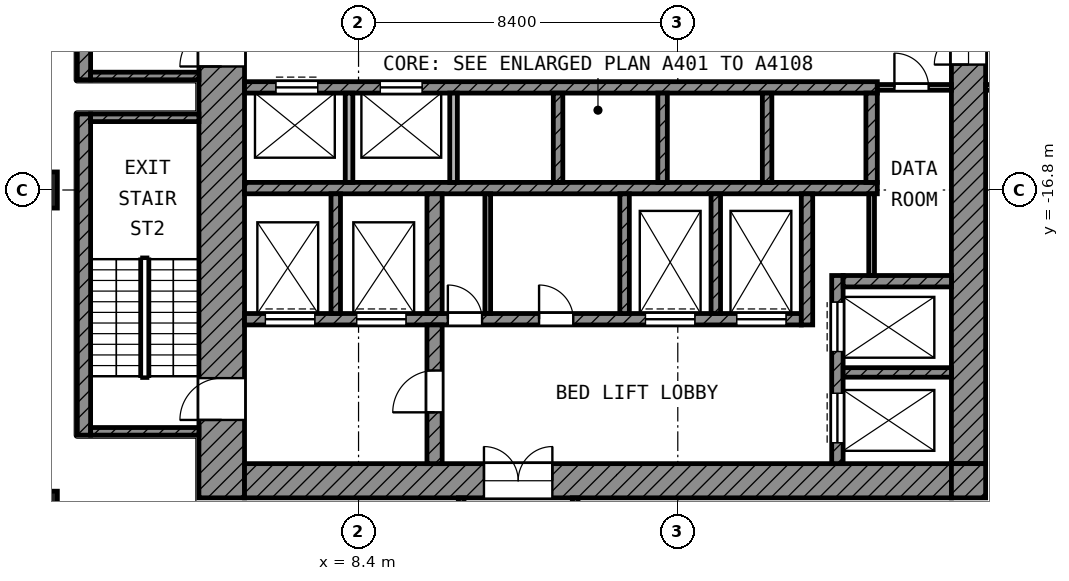
"""IFC4 building model, lengths in metres.
Left out: names, types, materials, properties, quantities, classifications, styles, units other than length and angle.
Written with IfcOpenShell. Run it as: python <this file> out.ifc"""

import sys

from ifc_helpers import new_model, si_unit, direction, frame, frame_2d, origin, origin_2d, place, context, subcontext, project, spatial, rectangle, extrude, element, fill, save


model = new_model("IFC4")
c1 = context("Model", 3, precision=1e-05, world=origin(), true_north=direction((0.0, 1.0)))
c2 = subcontext(c1, "Body", "Model", "MODEL_VIEW")
j1 = project(units=[si_unit("LENGTHUNIT", "METRE"), si_unit("PLANEANGLEUNIT", "RADIAN")], contexts=[c1])
p1 = place(None, origin())
s1 = spatial("IfcSite", under=j1, at=p1, CompositionType="ELEMENT")
p2 = place(p1, origin())
s2 = spatial("IfcBuilding", under=s1, at=p2, CompositionType="ELEMENT")
p3 = place(p2, frame((0.0, 0.0, 192.0)))
s3 = spatial("IfcBuildingStorey", under=s2, at=p3, CompositionType="ELEMENT", Elevation=192.0)
for number, where, z_axis, x_axis in (
    (1, (0.0, -16.8, 0.0), (0.0, 0.0, 1.0), (1.0, 0.0, 0.0)),
    (2, (0.0, -25.2, 0.0), (0.0, 0.0, 1.0), (1.0, 0.0, 0.0)),
):
    element("IfcColumn", number, at=place(p3, frame(where, z_axis=z_axis, x_axis=x_axis)), inside=s3, PredefinedType="COLUMN", context=c2, shape_type="SweptSolid", body=[
        extrude(rectangle(XDim=0.95, YDim=0.95, at=origin_2d()), origin(), (0.0, 0.0, 1.0), 4.2),
    ])
p4 = place(p3, frame((4.8, -24.9, 0.0), z_axis=(0.0, 0.0, 1.0), x_axis=(0.0, 1.0, 0.0)))
e3 = element("IfcWall", 3, at=p4, inside=s3, PredefinedType="SHEAR", context=c2, shape_type="SweptSolid", body=[
    extrude(rectangle(XDim=19.5, YDim=1.2, at=frame_2d((9.75, 0.0))), origin(), (0.0, 0.0, 1.0), 3.6),
])
p5 = place(p4, frame((11.35, 0.0, 0.0)))
e4 = element("IfcOpeningElement", 4, at=p5, cuts=e3, PredefinedType="OPENING", context=c2, shape_type="SweptSolid", body=[
    extrude(rectangle(XDim=1.1, YDim=2.1, at=frame_2d((0.55, 1.05))), frame((0.0, 0.61, 0.0), z_axis=(0.0, -1.0, 0.0), x_axis=(1.0, 0.0, 0.0)), (0.0, 0.0, 1.0), 1.22),
])
p6 = place(p4, frame((2.05, 0.0, 0.0)))
e5 = element("IfcOpeningElement", 5, at=p6, cuts=e3, PredefinedType="OPENING", context=c2, shape_type="SweptSolid", body=[
    extrude(rectangle(XDim=1.1, YDim=2.1, at=frame_2d((0.55, 1.05))), frame((0.0, 0.61, 0.0), z_axis=(0.0, -1.0, 0.0), x_axis=(1.0, 0.0, 0.0)), (0.0, 0.0, 1.0), 1.22),
])
p7 = place(p3, frame((24.45, -24.0, 0.0), z_axis=(0.0, 0.0, 1.0), x_axis=(0.0, 1.0, 0.0)))
e6 = element("IfcWall", 6, at=p7, inside=s3, PredefinedType="SHEAR", context=c2, shape_type="SweptSolid", body=[
    extrude(rectangle(XDim=18.6, YDim=0.9, at=frame_2d((9.3, 0.0))), origin(), (0.0, 0.0, 1.0), 3.6),
])
p8 = place(p7, frame((10.5, 0.0, 0.0)))
e7 = element("IfcOpeningElement", 7, at=p8, cuts=e6, PredefinedType="OPENING", context=c2, shape_type="SweptSolid", body=[
    extrude(rectangle(XDim=1.8, YDim=2.1, at=frame_2d((0.9, 1.05))), frame((0.0, 0.46, 0.0), z_axis=(0.0, -1.0, 0.0), x_axis=(1.0, 0.0, 0.0)), (0.0, 0.0, 1.0), 0.92),
])
p9 = place(p3, frame((5.4, -24.45, 0.0), z_axis=(0.0, 0.0, 1.0), x_axis=(1.0, 0.0, 0.0)))
e8 = element("IfcWall", 8, at=p9, inside=s3, PredefinedType="SHEAR", context=c2, shape_type="SweptSolid", body=[
    extrude(rectangle(XDim=18.6, YDim=0.9, at=frame_2d((9.3, 0.0))), origin(), (0.0, 0.0, 1.0), 3.6),
])
p10 = place(p9, frame((6.3, 0.0, 0.0)))
e9 = element("IfcOpeningElement", 9, at=p10, cuts=e8, PredefinedType="OPENING", context=c2, shape_type="SweptSolid", body=[
    extrude(rectangle(XDim=1.8, YDim=2.1, at=frame_2d((0.9, 1.05))), frame((0.0, 0.46, 0.0), z_axis=(0.0, -1.0, 0.0), x_axis=(1.0, 0.0, 0.0)), (0.0, 0.0, 1.0), 0.92),
])
p11 = place(p3, frame((24.45, -24.9, 0.0), z_axis=(0.0, 0.0, 1.0), x_axis=(0.0, 1.0, 0.0)))
e10 = element("IfcWall", 10, at=p11, inside=s3, PredefinedType="SHEAR", context=c2, shape_type="SweptSolid", body=[
    extrude(rectangle(XDim=0.9, YDim=0.9, at=frame_2d((0.45, 0.0))), origin(), (0.0, 0.0, 1.0), 3.6),
])
p12 = place(p3, frame((5.4, -14.1, 0.0), z_axis=(0.0, 0.0, 1.0), x_axis=(1.0, 0.0, 0.0)))
e11 = element("IfcWall", 11, at=p12, inside=s3, PredefinedType="SHEAR", context=c2, shape_type="SweptSolid", body=[
    extrude(rectangle(XDim=16.65, YDim=0.3, at=frame_2d((8.325, 0.0))), origin(), (0.0, 0.0, 1.0), 3.6),
])
p13 = place(p12, frame((0.825, 0.0, 0.0)))
e12 = element("IfcOpeningElement", 12, at=p13, cuts=e11, PredefinedType="OPENING", context=c2, shape_type="SweptSolid", body=[
    extrude(rectangle(XDim=1.1, YDim=2.1, at=frame_2d((0.55, 1.05))), frame((0.0, 0.16, 0.0), z_axis=(0.0, -1.0, 0.0), x_axis=(1.0, 0.0, 0.0)), (0.0, 0.0, 1.0), 0.32),
])
p14 = place(p12, frame((3.575, 0.0, 0.0)))
e13 = element("IfcOpeningElement", 13, at=p14, cuts=e11, PredefinedType="OPENING", context=c2, shape_type="SweptSolid", body=[
    extrude(rectangle(XDim=1.1, YDim=2.1, at=frame_2d((0.55, 1.05))), frame((0.0, 0.16, 0.0), z_axis=(0.0, -1.0, 0.0), x_axis=(1.0, 0.0, 0.0)), (0.0, 0.0, 1.0), 0.32),
])
p15 = place(p3, frame((5.4, -16.75, 0.0), z_axis=(0.0, 0.0, 1.0), x_axis=(1.0, 0.0, 0.0)))
e14 = element("IfcWall", 14, at=p15, inside=s3, PredefinedType="SHEAR", context=c2, shape_type="SweptSolid", body=[
    extrude(rectangle(XDim=16.65, YDim=0.3, at=frame_2d((8.325, 0.0))), origin(), (0.0, 0.0, 1.0), 3.6),
])
p16 = place(p3, frame((5.4, -20.2, 0.0), z_axis=(0.0, 0.0, 1.0), x_axis=(1.0, 0.0, 0.0)))
e15 = element("IfcWall", 15, at=p16, inside=s3, PredefinedType="SHEAR", context=c2, shape_type="SweptSolid", body=[
    extrude(rectangle(XDim=14.65, YDim=0.3, at=frame_2d((7.325, 0.0))), origin(), (0.0, 0.0, 1.0), 3.6),
])
p17 = place(p16, frame((10.55, 0.0, 0.0)))
e16 = element("IfcOpeningElement", 16, at=p17, cuts=e15, PredefinedType="OPENING", context=c2, shape_type="SweptSolid", body=[
    extrude(rectangle(XDim=1.3, YDim=2.1, at=frame_2d((0.65, 1.05))), frame((0.0, 0.16, 0.0), z_axis=(0.0, -1.0, 0.0), x_axis=(1.0, 0.0, 0.0)), (0.0, 0.0, 1.0), 0.32),
])
p18 = place(p16, frame((12.95, 0.0, 0.0)))
e17 = element("IfcOpeningElement", 17, at=p18, cuts=e15, PredefinedType="OPENING", context=c2, shape_type="SweptSolid", body=[
    extrude(rectangle(XDim=1.3, YDim=2.1, at=frame_2d((0.65, 1.05))), frame((0.0, 0.16, 0.0), z_axis=(0.0, -1.0, 0.0), x_axis=(1.0, 0.0, 0.0)), (0.0, 0.0, 1.0), 0.32),
])
p19 = place(p16, frame((0.55, 0.0, 0.0)))
e18 = element("IfcOpeningElement", 18, at=p19, cuts=e15, PredefinedType="OPENING", context=c2, shape_type="SweptSolid", body=[
    extrude(rectangle(XDim=1.3, YDim=2.1, at=frame_2d((0.65, 1.05))), frame((0.0, 0.16, 0.0), z_axis=(0.0, -1.0, 0.0), x_axis=(1.0, 0.0, 0.0)), (0.0, 0.0, 1.0), 0.32),
])
p20 = place(p16, frame((2.95, 0.0, 0.0)))
e19 = element("IfcOpeningElement", 19, at=p20, cuts=e15, PredefinedType="OPENING", context=c2, shape_type="SweptSolid", body=[
    extrude(rectangle(XDim=1.3, YDim=2.1, at=frame_2d((0.65, 1.05))), frame((0.0, 0.16, 0.0), z_axis=(0.0, -1.0, 0.0), x_axis=(1.0, 0.0, 0.0)), (0.0, 0.0, 1.0), 0.32),
])
p21 = place(p16, frame((5.35, 0.0, 0.0)))
e20 = element("IfcOpeningElement", 20, at=p21, cuts=e15, PredefinedType="OPENING", context=c2, shape_type="SweptSolid", body=[
    extrude(rectangle(XDim=0.9, YDim=2.1, at=frame_2d((0.45, 1.05))), frame((0.0, 0.16, 0.0), z_axis=(0.0, -1.0, 0.0), x_axis=(1.0, 0.0, 0.0)), (0.0, 0.0, 1.0), 0.32),
])
p22 = place(p16, frame((7.75, 0.0, 0.0)))
e21 = element("IfcOpeningElement", 21, at=p22, cuts=e15, PredefinedType="OPENING", context=c2, shape_type="SweptSolid", body=[
    extrude(rectangle(XDim=0.9, YDim=2.1, at=frame_2d((0.45, 1.05))), frame((0.0, 0.16, 0.0), z_axis=(0.0, -1.0, 0.0), x_axis=(1.0, 0.0, 0.0)), (0.0, 0.0, 1.0), 0.32),
])
p23 = place(p3, frame((10.4, -24.0, 0.0), z_axis=(0.0, 0.0, 1.0), x_axis=(0.0, 1.0, 0.0)))
e22 = element("IfcWall", 22, at=p23, inside=s3, PredefinedType="SHEAR", context=c2, shape_type="SweptSolid", body=[
    extrude(rectangle(XDim=3.65, YDim=0.4, at=frame_2d((1.825, 0.0))), origin(), (0.0, 0.0, 1.0), 3.6),
])
p24 = place(p23, frame((1.35, 0.0, 0.0)))
e23 = element("IfcOpeningElement", 23, at=p24, cuts=e22, PredefinedType="OPENING", context=c2, shape_type="SweptSolid", body=[
    extrude(rectangle(XDim=1.1, YDim=2.1, at=frame_2d((0.55, 1.05))), frame((0.0, 0.21, 0.0), z_axis=(0.0, -1.0, 0.0), x_axis=(1.0, 0.0, 0.0)), (0.0, 0.0, 1.0), 0.42),
])
p25 = place(p3, frame((10.4, -20.05, 0.0), z_axis=(0.0, 0.0, 1.0), x_axis=(0.0, 1.0, 0.0)))
e24 = element("IfcWall", 24, at=p25, inside=s3, PredefinedType="SHEAR", context=c2, shape_type="SweptSolid", body=[
    extrude(rectangle(XDim=3.15, YDim=0.4, at=frame_2d((1.575, 0.0))), origin(), (0.0, 0.0, 1.0), 3.6),
])
p26 = place(p3, frame((20.2, -20.35, 0.0), z_axis=(0.0, 0.0, 1.0), x_axis=(0.0, 1.0, 0.0)))
e25 = element("IfcWall", 25, at=p26, inside=s3, PredefinedType="SHEAR", context=c2, shape_type="SweptSolid", body=[
    extrude(rectangle(XDim=3.45, YDim=0.3, at=frame_2d((1.725, 0.0))), origin(), (0.0, 0.0, 1.0), 3.6),
])
p27 = place(p3, frame((21.9, -16.6, 0.0), z_axis=(0.0, 0.0, 1.0), x_axis=(0.0, 1.0, 0.0)))
e26 = element("IfcWall", 26, at=p27, inside=s3, PredefinedType="SHEAR", context=c2, shape_type="SweptSolid", body=[
    extrude(rectangle(XDim=2.35, YDim=0.3, at=frame_2d((1.175, 0.0))), origin(), (0.0, 0.0, 1.0), 3.6),
])
p28 = place(p3, frame((21.15, -19.2, 0.0), z_axis=(0.0, 0.0, 1.0), x_axis=(1.0, 0.0, 0.0)))
e27 = element("IfcWall", 27, at=p28, inside=s3, PredefinedType="SHEAR", context=c2, shape_type="SweptSolid", body=[
    extrude(rectangle(XDim=2.85, YDim=0.3, at=frame_2d((1.425, 0.0))), origin(), (0.0, 0.0, 1.0), 3.6),
])
p29 = place(p3, frame((21.0, -24.0, 0.0), z_axis=(0.0, 0.0, 1.0), x_axis=(0.0, 1.0, 0.0)))
e28 = element("IfcWall", 28, at=p29, inside=s3, PredefinedType="SHEAR", context=c2, shape_type="SweptSolid", body=[
    extrude(rectangle(XDim=4.95, YDim=0.3, at=frame_2d((2.475, 0.0))), origin(), (0.0, 0.0, 1.0), 3.6),
])
p30 = place(p29, frame((2.95, 0.0, 0.0)))
e29 = element("IfcOpeningElement", 29, at=p30, cuts=e28, PredefinedType="OPENING", context=c2, shape_type="SweptSolid", body=[
    extrude(rectangle(XDim=1.3, YDim=2.1, at=frame_2d((0.65, 1.05))), frame((0.0, 0.16, 0.0), z_axis=(0.0, -1.0, 0.0), x_axis=(1.0, 0.0, 0.0)), (0.0, 0.0, 1.0), 0.32),
])
p31 = place(p29, frame((0.55, 0.0, 0.0)))
e30 = element("IfcOpeningElement", 30, at=p31, cuts=e28, PredefinedType="OPENING", context=c2, shape_type="SweptSolid", body=[
    extrude(rectangle(XDim=1.3, YDim=2.1, at=frame_2d((0.65, 1.05))), frame((0.0, 0.16, 0.0), z_axis=(0.0, -1.0, 0.0), x_axis=(1.0, 0.0, 0.0)), (0.0, 0.0, 1.0), 0.32),
])
p32 = place(p3, frame((21.15, -21.6, 0.0), z_axis=(0.0, 0.0, 1.0), x_axis=(1.0, 0.0, 0.0)))
e31 = element("IfcWall", 31, at=p32, inside=s3, PredefinedType="SHEAR", context=c2, shape_type="SweptSolid", body=[
    extrude(rectangle(XDim=2.85, YDim=0.25, at=frame_2d((1.425, 0.0))), origin(), (0.0, 0.0, 1.0), 3.6),
])
for number, where, z_axis, x_axis in (
    (32, (7.8, -20.05, 0.0), (0.0, 0.0, 1.0), (0.0, 1.0, 0.0)),
    (33, (15.4, -20.05, 0.0), (0.0, 0.0, 1.0), (0.0, 1.0, 0.0)),
    (34, (17.8, -20.05, 0.0), (0.0, 0.0, 1.0), (0.0, 1.0, 0.0)),
):
    element("IfcWall", number, at=place(p3, frame(where, z_axis=z_axis, x_axis=x_axis)), inside=s3, PredefinedType="SHEAR", context=c2, shape_type="SweptSolid", body=[
        extrude(rectangle(XDim=3.15, YDim=0.25, at=frame_2d((1.575, 0.0))), origin(), (0.0, 0.0, 1.0), 3.6),
    ])
for number, where, z_axis, x_axis in (
    (35, (8.15, -16.6, 0.0), (0.0, 0.0, 1.0), (0.0, 1.0, 0.0)),
    (36, (10.9, -16.6, 0.0), (0.0, 0.0, 1.0), (0.0, 1.0, 0.0)),
):
    element("IfcWall", number, at=place(p3, frame(where, z_axis=z_axis, x_axis=x_axis)), inside=s3, PredefinedType="PARTITIONING", context=c2, shape_type="SweptSolid", body=[
        extrude(rectangle(XDim=2.35, YDim=0.2, at=frame_2d((1.175, 0.0))), origin(), (0.0, 0.0, 1.0), 3.6),
    ])
for number, where, z_axis, x_axis in (
    (37, (13.65, -16.6, 0.0), (0.0, 0.0, 1.0), (0.0, 1.0, 0.0)),
    (38, (16.4, -16.6, 0.0), (0.0, 0.0, 1.0), (0.0, 1.0, 0.0)),
    (39, (19.15, -16.6, 0.0), (0.0, 0.0, 1.0), (0.0, 1.0, 0.0)),
):
    element("IfcWall", number, at=place(p3, frame(where, z_axis=z_axis, x_axis=x_axis)), inside=s3, PredefinedType="SHEAR", context=c2, shape_type="SweptSolid", body=[
        extrude(rectangle(XDim=2.35, YDim=0.25, at=frame_2d((1.175, 0.0))), origin(), (0.0, 0.0, 1.0), 3.6),
    ])
p33 = place(p3, frame((21.9, -19.05, 0.0), z_axis=(0.0, 0.0, 1.0), x_axis=(0.0, 1.0, 0.0)))
e40 = element("IfcWall", 40, at=p33, inside=s3, PredefinedType="PARTITIONING", context=c2, shape_type="SweptSolid", body=[
    extrude(rectangle(XDim=2.15, YDim=0.15, at=frame_2d((1.075, 0.0))), origin(), (0.0, 0.0, 1.0), 3.6),
])
p34 = place(p3, frame((22.05, -14.1, 0.0), z_axis=(0.0, 0.0, 1.0), x_axis=(1.0, 0.0, 0.0)))
e41 = element("IfcWall", 41, at=p34, inside=s3, PredefinedType="PARTITIONING", context=c2, shape_type="SweptSolid", body=[
    extrude(rectangle(XDim=1.95, YDim=0.15, at=frame_2d((0.975, 0.0))), origin(), (0.0, 0.0, 1.0), 3.6),
])
p35 = place(p34, frame((0.45, 0.0, 0.0)))
e42 = element("IfcOpeningElement", 42, at=p35, cuts=e41, PredefinedType="OPENING", context=c2, shape_type="SweptSolid", body=[
    extrude(rectangle(XDim=0.9, YDim=2.1, at=frame_2d((0.45, 1.05))), frame((0.0, 0.085, 0.0), z_axis=(0.0, -1.0, 0.0), x_axis=(1.0, 0.0, 0.0)), (0.0, 0.0, 1.0), 0.17),
])
p36 = place(p3, frame((11.8, -20.05, 0.0), z_axis=(0.0, 0.0, 1.0), x_axis=(0.0, 1.0, 0.0)))
e43 = element("IfcWall", 43, at=p36, inside=s3, PredefinedType="PARTITIONING", context=c2, shape_type="SweptSolid", body=[
    extrude(rectangle(XDim=3.15, YDim=0.15, at=frame_2d((1.575, 0.0))), origin(), (0.0, 0.0, 1.0), 3.6),
])
p37 = place(p3, frame((1.175, -13.9, 0.0), z_axis=(0.0, 0.0, 1.0), x_axis=(0.0, 1.0, 0.0)))
e44 = element("IfcWall", 44, at=p37, inside=s3, PredefinedType="SHEAR", context=c2, shape_type="SweptSolid", body=[
    extrude(rectangle(XDim=8.45, YDim=0.35, at=frame_2d((4.225, 0.0))), origin(), (0.0, 0.0, 1.0), 3.6),
])
p38 = place(p3, frame((1.35, -13.8, 0.0), z_axis=(0.0, 0.0, 1.0), x_axis=(1.0, 0.0, 0.0)))
e45 = element("IfcWall", 45, at=p38, inside=s3, PredefinedType="SHEAR", context=c2, shape_type="SweptSolid", body=[
    extrude(rectangle(XDim=2.85, YDim=0.2, at=frame_2d((1.425, 0.0))), origin(), (0.0, 0.0, 1.0), 3.6),
])
p39 = place(p3, frame((1.175, -23.25, 0.0), z_axis=(0.0, 0.0, 1.0), x_axis=(0.0, 1.0, 0.0)))
e46 = element("IfcWall", 46, at=p39, inside=s3, PredefinedType="SHEAR", context=c2, shape_type="SweptSolid", body=[
    extrude(rectangle(XDim=8.45, YDim=0.35, at=frame_2d((4.225, 0.0))), origin(), (0.0, 0.0, 1.0), 3.6),
])
for number, where, z_axis, x_axis in (
    (47, (1.35, -14.9, 0.0), (0.0, 0.0, 1.0), (1.0, 0.0, 0.0)),
    (48, (1.35, -23.15, 0.0), (0.0, 0.0, 1.0), (1.0, 0.0, 0.0)),
):
    element("IfcWall", number, at=place(p3, frame(where, z_axis=z_axis, x_axis=x_axis)), inside=s3, PredefinedType="SHEAR", context=c2, shape_type="SweptSolid", body=[
        extrude(rectangle(XDim=2.85, YDim=0.2, at=frame_2d((1.425, 0.0))), origin(), (0.0, 0.0, 1.0), 3.6),
    ])
p40 = place(p3, frame((24.9, -14.1, 0.0), z_axis=(0.0, 0.0, 1.0), x_axis=(1.0, 0.0, 0.0)))
e49 = element("IfcWall", 49, at=p40, inside=s3, PredefinedType="PARTITIONING", context=c2, shape_type="SweptSolid", body=[
    extrude(rectangle(XDim=4.425, YDim=0.15, at=frame_2d((2.212, 0.0))), origin(), (0.0, 0.0, 1.0), 3.6),
])
p41 = place(p40, frame((1.65, 0.0, 0.0)))
e50 = element("IfcOpeningElement", 50, at=p41, cuts=e49, PredefinedType="OPENING", context=c2, shape_type="SweptSolid", body=[
    extrude(rectangle(XDim=1.5, YDim=2.1, at=frame_2d((0.75, 1.05))), frame((0.0, 0.085, 0.0), z_axis=(0.0, -1.0, 0.0), x_axis=(1.0, 0.0, 0.0)), (0.0, 0.0, 1.0), 0.17),
])
p42 = place(p3, frame((11.1, -29.397, 0.0), z_axis=(0.0, 0.0, 1.0), x_axis=(0.0, 1.0, 0.0)))
e51 = element("IfcWall", 51, at=p42, inside=s3, PredefinedType="PARTITIONING", context=c2, shape_type="SweptSolid", body=[
    extrude(rectangle(XDim=4.497, YDim=0.15, at=frame_2d((2.249, 0.0))), origin(), (0.0, 0.0, 1.0), 3.6),
])
p43 = place(p3, frame((14.1, -29.4, 0.0), z_axis=(0.0, 0.0, 1.0), x_axis=(0.0, 1.0, 0.0)))
e52 = element("IfcWall", 52, at=p43, inside=s3, PredefinedType="PARTITIONING", context=c2, shape_type="SweptSolid", body=[
    extrude(rectangle(XDim=4.5, YDim=0.15, at=frame_2d((2.25, 0.0))), origin(), (0.0, 0.0, 1.0), 3.6),
])
p44 = place(p13, origin())
e53 = element("IfcDoor", 53, at=p44, inside=s3, OperationType="DOUBLE_DOOR_SLIDING", PredefinedType="DOOR", context=c2, shape_type="SweptSolid", body=[
    extrude(rectangle(XDim=1.1, YDim=2.1, at=frame_2d((0.55, 1.05))), frame((0.0, 0.025, 0.0), z_axis=(0.0, -1.0, 0.0), x_axis=(1.0, 0.0, 0.0)), (0.0, 0.0, 1.0), 0.05),
])
fill(e12, e53)
p45 = place(p14, origin())
e54 = element("IfcDoor", 54, at=p45, inside=s3, OperationType="DOUBLE_DOOR_SLIDING", PredefinedType="DOOR", context=c2, shape_type="SweptSolid", body=[
    extrude(rectangle(XDim=1.1, YDim=2.1, at=frame_2d((0.55, 1.05))), frame((0.0, 0.025, 0.0), z_axis=(0.0, -1.0, 0.0), x_axis=(1.0, 0.0, 0.0)), (0.0, 0.0, 1.0), 0.05),
])
fill(e13, e54)
p46 = place(p30, origin())
e55 = element("IfcDoor", 55, at=p46, inside=s3, OperationType="DOUBLE_DOOR_SLIDING", PredefinedType="DOOR", context=c2, shape_type="SweptSolid", body=[
    extrude(rectangle(XDim=1.3, YDim=2.1, at=frame_2d((0.65, 1.05))), frame((0.0, 0.025, 0.0), z_axis=(0.0, -1.0, 0.0), x_axis=(1.0, 0.0, 0.0)), (0.0, 0.0, 1.0), 0.05),
])
fill(e29, e55)
p47 = place(p31, origin())
e56 = element("IfcDoor", 56, at=p47, inside=s3, OperationType="DOUBLE_DOOR_SLIDING", PredefinedType="DOOR", context=c2, shape_type="SweptSolid", body=[
    extrude(rectangle(XDim=1.3, YDim=2.1, at=frame_2d((0.65, 1.05))), frame((0.0, 0.025, 0.0), z_axis=(0.0, -1.0, 0.0), x_axis=(1.0, 0.0, 0.0)), (0.0, 0.0, 1.0), 0.05),
])
fill(e30, e56)
p48 = place(p17, origin())
e57 = element("IfcDoor", 57, at=p48, inside=s3, OperationType="DOUBLE_DOOR_SLIDING", PredefinedType="DOOR", context=c2, shape_type="SweptSolid", body=[
    extrude(rectangle(XDim=1.3, YDim=2.1, at=frame_2d((0.65, 1.05))), frame((0.0, 0.025, 0.0), z_axis=(0.0, -1.0, 0.0), x_axis=(1.0, 0.0, 0.0)), (0.0, 0.0, 1.0), 0.05),
])
fill(e16, e57)
p49 = place(p18, origin())
e58 = element("IfcDoor", 58, at=p49, inside=s3, OperationType="DOUBLE_DOOR_SLIDING", PredefinedType="DOOR", context=c2, shape_type="SweptSolid", body=[
    extrude(rectangle(XDim=1.3, YDim=2.1, at=frame_2d((0.65, 1.05))), frame((0.0, 0.025, 0.0), z_axis=(0.0, -1.0, 0.0), x_axis=(1.0, 0.0, 0.0)), (0.0, 0.0, 1.0), 0.05),
])
fill(e17, e58)
p50 = place(p19, origin())
e59 = element("IfcDoor", 59, at=p50, inside=s3, OperationType="DOUBLE_DOOR_SLIDING", PredefinedType="DOOR", context=c2, shape_type="SweptSolid", body=[
    extrude(rectangle(XDim=1.3, YDim=2.1, at=frame_2d((0.65, 1.05))), frame((0.0, 0.025, 0.0), z_axis=(0.0, -1.0, 0.0), x_axis=(1.0, 0.0, 0.0)), (0.0, 0.0, 1.0), 0.05),
])
fill(e18, e59)
p51 = place(p20, origin())
e60 = element("IfcDoor", 60, at=p51, inside=s3, OperationType="DOUBLE_DOOR_SLIDING", PredefinedType="DOOR", context=c2, shape_type="SweptSolid", body=[
    extrude(rectangle(XDim=1.3, YDim=2.1, at=frame_2d((0.65, 1.05))), frame((0.0, 0.025, 0.0), z_axis=(0.0, -1.0, 0.0), x_axis=(1.0, 0.0, 0.0)), (0.0, 0.0, 1.0), 0.05),
])
fill(e19, e60)
p52 = place(p5, origin())
e61 = element("IfcDoor", 61, at=p52, inside=s3, OperationType="SINGLE_SWING_LEFT", PredefinedType="DOOR", context=c2, shape_type="SweptSolid", body=[
    extrude(rectangle(XDim=1.1, YDim=2.1, at=frame_2d((0.55, 1.05))), frame((0.0, 0.025, 0.0), z_axis=(0.0, -1.0, 0.0), x_axis=(1.0, 0.0, 0.0)), (0.0, 0.0, 1.0), 0.05),
])
fill(e4, e61)
p53 = place(p6, origin())
e62 = element("IfcDoor", 62, at=p53, inside=s3, OperationType="SINGLE_SWING_LEFT", PredefinedType="DOOR", context=c2, shape_type="SweptSolid", body=[
    extrude(rectangle(XDim=1.1, YDim=2.1, at=frame_2d((0.55, 1.05))), frame((0.0, 0.025, 0.0), z_axis=(0.0, -1.0, 0.0), x_axis=(1.0, 0.0, 0.0)), (0.0, 0.0, 1.0), 0.05),
])
fill(e5, e62)
p54 = place(p24, origin())
e63 = element("IfcDoor", 63, at=p54, inside=s3, OperationType="SINGLE_SWING_LEFT", PredefinedType="DOOR", context=c2, shape_type="SweptSolid", body=[
    extrude(rectangle(XDim=1.1, YDim=2.1, at=frame_2d((0.55, 1.05))), frame((0.0, 0.025, 0.0), z_axis=(0.0, -1.0, 0.0), x_axis=(1.0, 0.0, 0.0)), (0.0, 0.0, 1.0), 0.05),
])
fill(e23, e63)
p55 = place(p8, origin())
e64 = element("IfcDoor", 64, at=p55, inside=s3, OperationType="DOUBLE_DOOR_SINGLE_SWING", PredefinedType="DOOR", context=c2, shape_type="SweptSolid", body=[
    extrude(rectangle(XDim=1.8, YDim=2.1, at=frame_2d((0.9, 1.05))), frame((0.0, 0.025, 0.0), z_axis=(0.0, -1.0, 0.0), x_axis=(1.0, 0.0, 0.0)), (0.0, 0.0, 1.0), 0.05),
])
fill(e7, e64)
p56 = place(p10, origin())
e65 = element("IfcDoor", 65, at=p56, inside=s3, OperationType="DOUBLE_DOOR_SINGLE_SWING", PredefinedType="DOOR", context=c2, shape_type="SweptSolid", body=[
    extrude(rectangle(XDim=1.8, YDim=2.1, at=frame_2d((0.9, 1.05))), frame((0.0, 0.025, 0.0), z_axis=(0.0, -1.0, 0.0), x_axis=(1.0, 0.0, 0.0)), (0.0, 0.0, 1.0), 0.05),
])
fill(e9, e65)
p57 = place(p35, origin())
e66 = element("IfcDoor", 66, at=p57, inside=s3, OperationType="SINGLE_SWING_LEFT", PredefinedType="DOOR", context=c2, shape_type="SweptSolid", body=[
    extrude(rectangle(XDim=0.9, YDim=2.1, at=frame_2d((0.45, 1.05))), frame((0.0, 0.025, 0.0), z_axis=(0.0, -1.0, 0.0), x_axis=(1.0, 0.0, 0.0)), (0.0, 0.0, 1.0), 0.05),
])
fill(e42, e66)
p58 = place(p21, origin())
e67 = element("IfcDoor", 67, at=p58, inside=s3, OperationType="SINGLE_SWING_LEFT", PredefinedType="DOOR", context=c2, shape_type="SweptSolid", body=[
    extrude(rectangle(XDim=0.9, YDim=2.1, at=frame_2d((0.45, 1.05))), frame((0.0, 0.025, 0.0), z_axis=(0.0, -1.0, 0.0), x_axis=(1.0, 0.0, 0.0)), (0.0, 0.0, 1.0), 0.05),
])
fill(e20, e67)
p59 = place(p22, origin())
e68 = element("IfcDoor", 68, at=p59, inside=s3, OperationType="SINGLE_SWING_LEFT", PredefinedType="DOOR", context=c2, shape_type="SweptSolid", body=[
    extrude(rectangle(XDim=0.9, YDim=2.1, at=frame_2d((0.45, 1.05))), frame((0.0, 0.025, 0.0), z_axis=(0.0, -1.0, 0.0), x_axis=(1.0, 0.0, 0.0)), (0.0, 0.0, 1.0), 0.05),
])
fill(e21, e68)
save(model, sys.argv[1])
